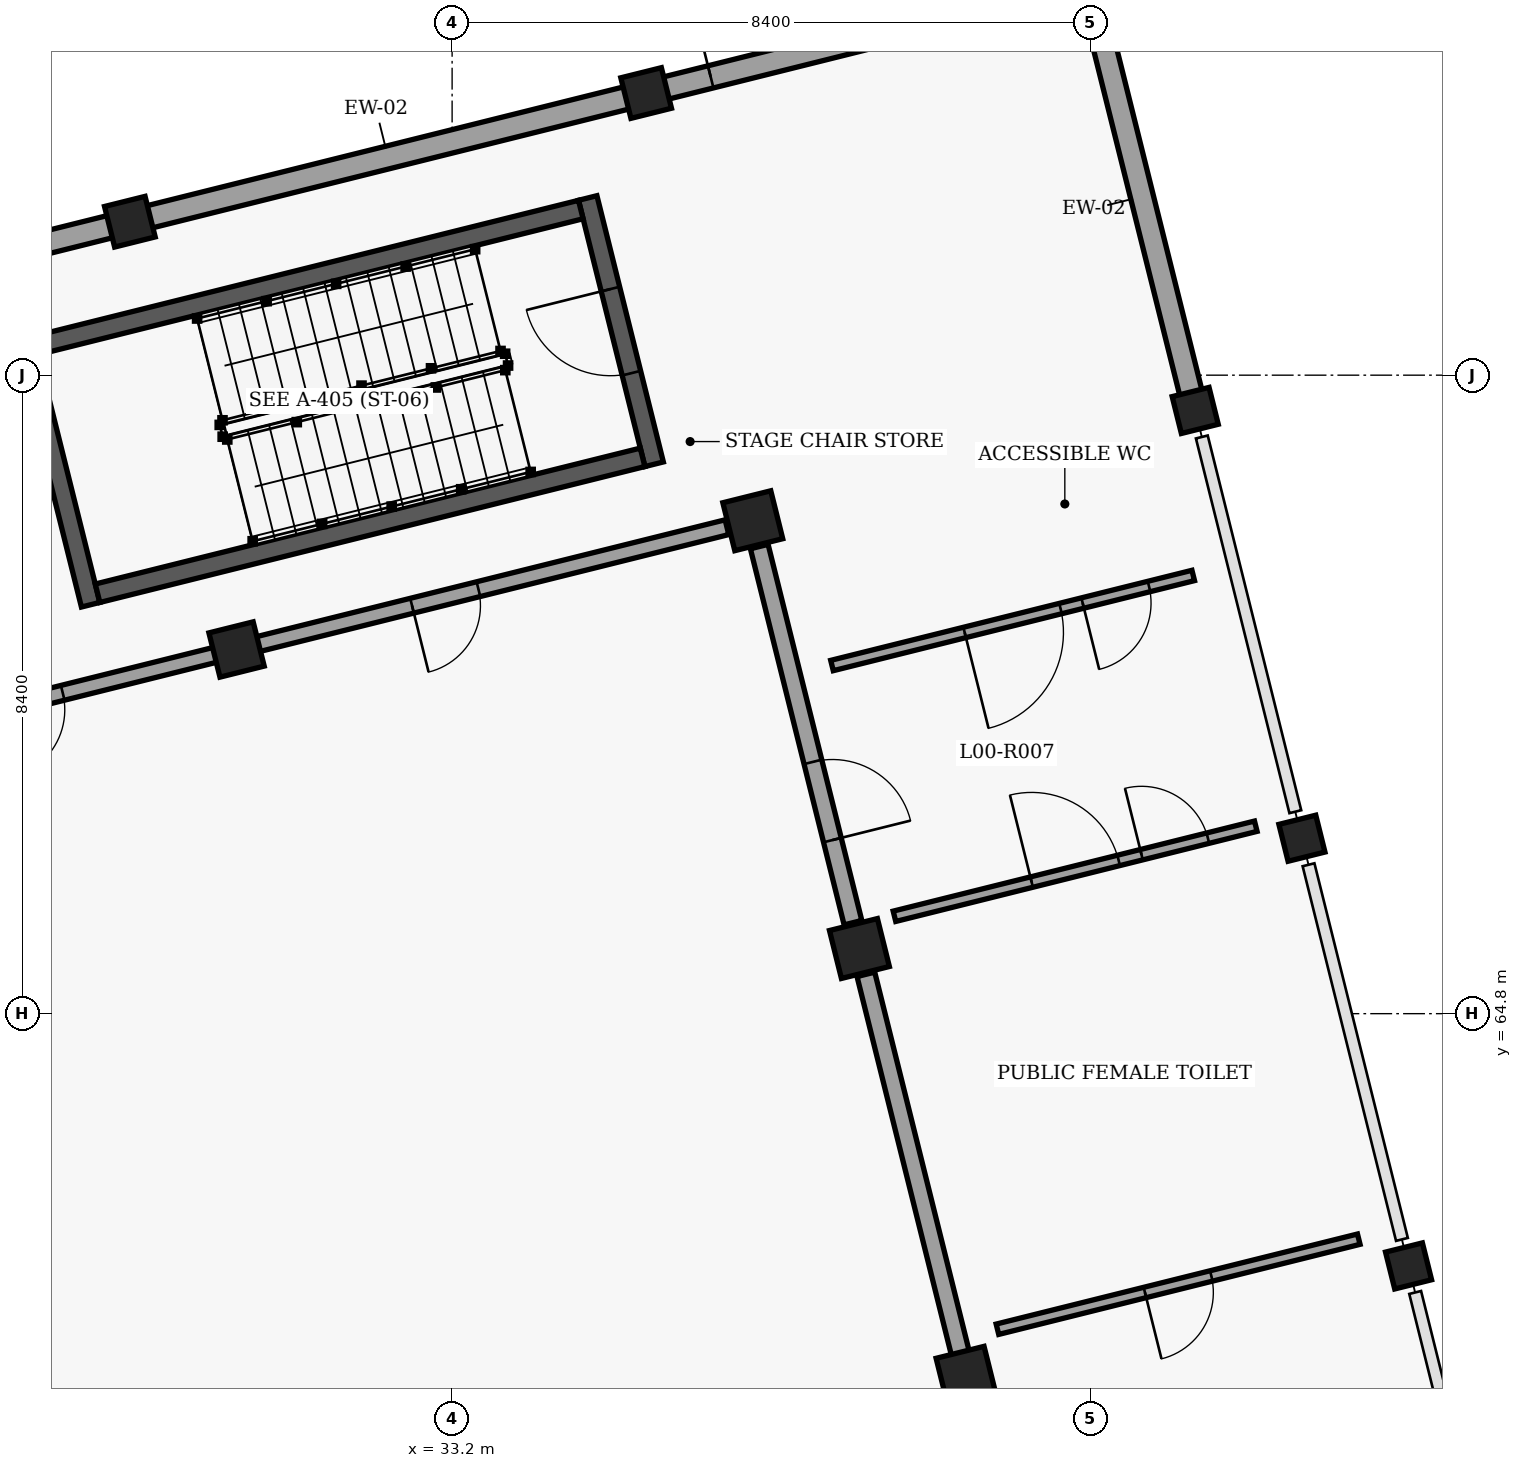
"""IFC4 building model, lengths in metres.
Left out: names, types, materials, properties, quantities, classifications, styles, units other than length and angle.
Written with IfcOpenShell. Run it as: python <this file> out.ifc"""

import sys

from ifc_helpers import new_model, si_unit, direction, frame, frame_2d, origin, origin_2d, place, context, subcontext, project, spatial, rectangle, extrude, element, fill, save


model = new_model("IFC4")
c1 = context("Model", 3, precision=1e-05, world=origin(), true_north=direction((0.0, 1.0)))
c2 = subcontext(c1, "Body", "Model", "MODEL_VIEW")
j1 = project(units=[si_unit("LENGTHUNIT", "METRE"), si_unit("PLANEANGLEUNIT", "RADIAN")], contexts=[c1])
p1 = place(None, origin())
s1 = spatial("IfcSite", under=j1, at=p1, CompositionType="ELEMENT")
p2 = place(p1, origin())
s2 = spatial("IfcBuilding", under=s1, at=p2, CompositionType="ELEMENT")
p3 = place(p2, origin())
s3 = spatial("IfcBuildingStorey", under=s2, at=p3, CompositionType="ELEMENT", Elevation=0.0)
for number, where, z_axis, x_axis in (
    (1, (39.962, 60.029, 0.0), (0.0, 0.0, 1.0), (0.97, 0.242, 0.0)),
    (2, (38.559, 65.657, 0.0), (0.0, 0.0, 1.0), (0.97, 0.242, 0.0)),
    (3, (37.156, 71.285, 0.0), (0.0, 0.0, 1.0), (0.97, 0.242, 0.0)),
):
    element("IfcColumn", number, at=place(p3, frame(where, z_axis=z_axis, x_axis=x_axis)), inside=s3, PredefinedType="COLUMN", context=c2, shape_type="SweptSolid", body=[
        extrude(rectangle(XDim=0.65, YDim=0.65, at=origin_2d()), origin(), (0.0, 0.0, 1.0), 4.8),
    ])
for number, where, z_axis, x_axis in (
    (4, (45.784, 61.481, 0.0), (0.0, 0.0, 1.0), (0.97, 0.242, 0.0)),
    (5, (44.381, 67.108, 0.0), (0.0, 0.0, 1.0), (0.97, 0.242, 0.0)),
    (6, (42.977, 72.736, 0.0), (0.0, 0.0, 1.0), (0.97, 0.242, 0.0)),
):
    element("IfcColumn", number, at=place(p3, frame(where, z_axis=z_axis, x_axis=x_axis)), inside=s3, PredefinedType="COLUMN", context=c2, shape_type="SweptSolid", body=[
        extrude(rectangle(XDim=0.5, YDim=0.5, at=origin_2d()), origin(), (0.0, 0.0, 1.0), 4.8),
    ])
p4 = place(p3, frame((30.364, 69.591, 0.0), z_axis=(0.0, 0.0, 1.0), x_axis=(0.970295726276, 0.2419218956, 0.0)))
e7 = element("IfcColumn", 7, at=p4, inside=s3, PredefinedType="COLUMN", context=c2, shape_type="SweptSolid", body=[
    extrude(rectangle(XDim=0.6, YDim=0.6, at=origin_2d()), origin(), (0.0, 0.0, 1.0), 4.8),
])
for number, where, z_axis, x_axis in (
    (8, (28.96, 75.219, 0.0), (0.0, 0.0, 1.0), (0.97, 0.242, 0.0)),
    (9, (35.753, 76.912, 0.0), (0.0, 0.0, 1.0), (0.97, 0.242, 0.0)),
):
    element("IfcColumn", number, at=place(p3, frame(where, z_axis=z_axis, x_axis=x_axis)), inside=s3, PredefinedType="COLUMN", context=c2, shape_type="SweptSolid", body=[
        extrude(rectangle(XDim=0.55, YDim=0.55, at=origin_2d()), origin(), (0.0, 0.0, 1.0), 4.8),
    ])
p5 = place(p3, frame((42.958, 72.814, 0.0), z_axis=(0.0, 0.0, 1.0), x_axis=(-0.242036480393, 0.970267149892, 0.0)))
e10 = element("IfcWall", 10, at=p5, inside=s3, PredefinedType="SOLIDWALL", context=c2, shape_type="SweptSolid", body=[
    extrude(rectangle(XDim=5.64, YDim=0.3, at=frame_2d((2.82, 0.0))), origin(), (0.0, 0.0, 1.0), 4.095),
])
p6 = place(p3, frame((22.265, 73.55, 0.0), z_axis=(0.0, 0.0, 1.0), x_axis=(0.970298579828, 0.24191045034, 0.0)))
e11 = element("IfcWall", 11, at=p6, inside=s3, PredefinedType="SOLIDWALL", context=c2, shape_type="SweptSolid", body=[
    extrude(rectangle(XDim=6.8, YDim=0.3, at=frame_2d((3.4, 0.0))), origin(), (0.0, 0.0, 1.0), 4.065),
])
p7 = place(p3, frame((29.058, 75.243, 0.0), z_axis=(0.0, 0.0, 1.0), x_axis=(0.970296478685, 0.241918877831, 0.0)))
e12 = element("IfcWall", 12, at=p7, inside=s3, PredefinedType="SOLIDWALL", context=c2, shape_type="SweptSolid", body=[
    extrude(rectangle(XDim=6.8, YDim=0.3, at=frame_2d((3.4, 0.0))), origin(), (0.0, 0.0, 1.0), 4.065),
])
p8 = place(p3, frame((35.85, 76.937, 0.0), z_axis=(0.0, 0.0, 1.0), x_axis=(0.97029090175, 0.241941244896, 0.0)))
e13 = element("IfcWall", 13, at=p8, inside=s3, PredefinedType="SOLIDWALL", context=c2, shape_type="SweptSolid", body=[
    extrude(rectangle(XDim=5.799, YDim=0.3, at=frame_2d((2.9, 0.0))), origin(), (0.0, 0.0, 1.0), 4.065),
])
p9 = place(p8, frame((0.775, 0.0, 0.0)))
e14 = element("IfcOpeningElement", 14, at=p9, cuts=e13, PredefinedType="OPENING", context=c2, shape_type="SweptSolid", body=[
    extrude(rectangle(XDim=2.05, YDim=2.32, at=frame_2d((1.025, 1.16))), frame((0.0, 0.16, 0.0), z_axis=(0.0, -1.0, 0.0), x_axis=(1.0, 0.0, 0.0)), (0.0, 0.0, 1.0), 0.32),
])
p10 = place(p3, frame((34.984, 75.531, 0.0), z_axis=(0.0, 0.0, 1.0), x_axis=(0.242090083699, -0.97025377679, 0.0)))
e15 = element("IfcWall", 15, at=p10, inside=s3, PredefinedType="SHEAR", context=c2, shape_type="SweptSolid", body=[
    extrude(rectangle(XDim=3.61, YDim=0.25, at=frame_2d((1.805, 0.0))), origin(), (0.0, 0.0, 1.0), 4.56),
])
p11 = place(p10, frame((1.235, 0.0, 0.0)))
e16 = element("IfcOpeningElement", 16, at=p11, cuts=e15, PredefinedType="OPENING", context=c2, shape_type="SweptSolid", body=[
    extrude(rectangle(XDim=1.14, YDim=2.15, at=frame_2d((0.57, 1.075))), frame((0.0, 0.135, 0.0), z_axis=(0.0, -1.0, 0.0), x_axis=(1.0, 0.0, 0.0)), (0.0, 0.0, 1.0), 0.27),
])
p12 = place(p3, frame((28.444, 70.18, 0.0), z_axis=(0.0, 0.0, 1.0), x_axis=(-0.241898912952, 0.970301456204, 0.0)))
e17 = element("IfcWall", 17, at=p12, inside=s3, PredefinedType="SHEAR", context=c2, shape_type="SweptSolid", body=[
    extrude(rectangle(XDim=3.609, YDim=0.25, at=frame_2d((1.805, 0.0))), origin(), (0.0, 0.0, 1.0), 4.56),
])
p13 = place(p3, frame((35.706, 72.119, 0.0), z_axis=(0.0, 0.0, 1.0), x_axis=(-0.970299691856, -0.241905989972, 0.0)))
e18 = element("IfcWall", 18, at=p13, inside=s3, PredefinedType="SHEAR", context=c2, shape_type="SweptSolid", body=[
    extrude(rectangle(XDim=7.391, YDim=0.25, at=frame_2d((3.695, 0.0))), origin(), (0.0, 0.0, 1.0), 4.56),
])
p14 = place(p3, frame((27.723, 73.591, 0.0), z_axis=(0.0, 0.0, 1.0), x_axis=(0.970291958031, 0.241937008705, 0.0)))
e19 = element("IfcWall", 19, at=p14, inside=s3, PredefinedType="SHEAR", context=c2, shape_type="SweptSolid", body=[
    extrude(rectangle(XDim=7.39, YDim=0.25, at=frame_2d((3.695, 0.0))), origin(), (0.0, 0.0, 1.0), 4.56),
])
p15 = place(p3, frame((41.28, 54.742, 0.0), z_axis=(0.0, 0.0, 1.0), x_axis=(-0.241866165603, 0.970309619625, 0.0)))
e20 = element("IfcWall", 20, at=p15, inside=s3, PredefinedType="PARTITIONING", context=c2, shape_type="SweptSolid", body=[
    extrude(rectangle(XDim=10.898, YDim=0.24, at=frame_2d((5.449, 0.0))), origin(), (0.0, 0.0, 1.0), 4.006),
])
p16 = place(p15, frame((3.539, 0.0, 0.0)))
e21 = element("IfcOpeningElement", 21, at=p16, cuts=e20, PredefinedType="OPENING", context=c2, shape_type="SweptSolid", body=[
    extrude(rectangle(XDim=1.12, YDim=2.16, at=frame_2d((0.56, 1.08))), frame((0.0, 0.13, 0.0), z_axis=(0.0, -1.0, 0.0), x_axis=(1.0, 0.0, 0.0)), (0.0, 0.0, 1.0), 0.26),
])
p17 = place(p3, frame((38.474, 65.997, 0.0), z_axis=(0.0, 0.0, 1.0), x_axis=(-0.241825856576, 0.970319666446, 0.0)))
e22 = element("IfcWall", 22, at=p17, inside=s3, PredefinedType="PARTITIONING", context=c2, shape_type="SweptSolid", body=[
    extrude(rectangle(XDim=5.099, YDim=0.24, at=frame_2d((2.55, 0.0))), origin(), (0.0, 0.0, 1.0), 3.845),
])
p18 = place(p17, frame((1.12, 0.0, 0.0)))
e23 = element("IfcOpeningElement", 23, at=p18, cuts=e22, PredefinedType="OPENING", context=c2, shape_type="SweptSolid", body=[
    extrude(rectangle(XDim=1.06, YDim=2.16, at=frame_2d((0.53, 1.08))), frame((0.0, 0.13, 0.0), z_axis=(0.0, -1.0, 0.0), x_axis=(1.0, 0.0, 0.0)), (0.0, 0.0, 1.0), 0.26),
])
p19 = place(p3, frame((17.119, 66.289, 0.0), z_axis=(0.0, 0.0, 1.0), x_axis=(0.970297233618, 0.241915849902, 0.0)))
e24 = element("IfcWall", 24, at=p19, inside=s3, PredefinedType="PARTITIONING", context=c2, shape_type="SweptSolid", body=[
    extrude(rectangle(XDim=20.3, YDim=0.2, at=frame_2d((10.15, 0.0))), origin(), (0.0, 0.0, 1.0), 3.845),
])
p20 = place(p19, frame((7.192, 0.0, 0.0)))
e25 = element("IfcOpeningElement", 25, at=p20, cuts=e24, PredefinedType="OPENING", context=c2, shape_type="SweptSolid", body=[
    extrude(rectangle(XDim=0.95, YDim=2.12, at=frame_2d((0.475, 1.06))), frame((0.0, 0.11, 0.0), z_axis=(0.0, -1.0, 0.0), x_axis=(1.0, 0.0, 0.0)), (0.0, 0.0, 1.0), 0.22),
])
p21 = place(p19, frame((10.373, 0.0, 0.0)))
e26 = element("IfcOpeningElement", 26, at=p21, cuts=e24, PredefinedType="OPENING", context=c2, shape_type="SweptSolid", body=[
    extrude(rectangle(XDim=0.92, YDim=2.1, at=frame_2d((0.46, 1.05))), frame((0.0, 0.11, 0.0), z_axis=(0.0, -1.0, 0.0), x_axis=(1.0, 0.0, 0.0)), (0.0, 0.0, 1.0), 0.22),
])
p22 = place(p19, frame((5.12, 0.0, 0.0)))
e27 = element("IfcOpeningElement", 27, at=p22, cuts=e24, PredefinedType="OPENING", context=c2, shape_type="SweptSolid", body=[
    extrude(rectangle(XDim=0.9, YDim=2.06, at=frame_2d((0.45, 1.03))), frame((0.0, 0.11, 0.0), z_axis=(0.0, -1.0, 0.0), x_axis=(1.0, 0.0, 0.0)), (0.0, 0.0, 1.0), 0.22),
])
p23 = place(p19, frame((16.03, 0.0, 0.0)))
e28 = element("IfcOpeningElement", 28, at=p23, cuts=e24, PredefinedType="OPENING", context=c2, shape_type="SweptSolid", body=[
    extrude(rectangle(XDim=0.9, YDim=2.06, at=frame_2d((0.45, 1.03))), frame((0.0, 0.11, 0.0), z_axis=(0.0, -1.0, 0.0), x_axis=(1.0, 0.0, 0.0)), (0.0, 0.0, 1.0), 0.22),
])
p24 = place(p3, frame((40.375, 60.648, 0.0), z_axis=(0.0, 0.0, 1.0), x_axis=(0.970306426655, 0.241878974681, 0.0)))
e29 = element("IfcWall", 29, at=p24, inside=s3, PredefinedType="PARTITIONING", context=c2, shape_type="SweptSolid", body=[
    extrude(rectangle(XDim=4.899, YDim=0.14, at=frame_2d((2.45, 0.0))), origin(), (0.0, 0.0, 1.0), 4.187),
])
p25 = place(p24, frame((2.0, 0.0, 0.0)))
e30 = element("IfcOpeningElement", 30, at=p25, cuts=e29, PredefinedType="OPENING", context=c2, shape_type="SweptSolid", body=[
    extrude(rectangle(XDim=0.9, YDim=2.06, at=frame_2d((0.45, 1.03))), frame((0.0, 0.08, 0.0), z_axis=(0.0, -1.0, 0.0), x_axis=(1.0, 0.0, 0.0)), (0.0, 0.0, 1.0), 0.16),
])
p26 = place(p3, frame((39.02, 66.081, 0.0), z_axis=(0.0, 0.0, 1.0), x_axis=(0.970306426655, 0.241878974681, 0.0)))
e31 = element("IfcWall", 31, at=p26, inside=s3, PredefinedType="PARTITIONING", context=c2, shape_type="SweptSolid", body=[
    extrude(rectangle(XDim=4.899, YDim=0.14, at=frame_2d((2.45, 0.0))), origin(), (0.0, 0.0, 1.0), 4.187),
])
p27 = place(p26, frame((1.86, 0.0, 0.0)))
e32 = element("IfcOpeningElement", 32, at=p27, cuts=e31, PredefinedType="OPENING", context=c2, shape_type="SweptSolid", body=[
    extrude(rectangle(XDim=1.18, YDim=2.18, at=frame_2d((0.59, 1.09))), frame((0.0, 0.08, 0.0), z_axis=(0.0, -1.0, 0.0), x_axis=(1.0, 0.0, 0.0)), (0.0, 0.0, 1.0), 0.16),
])
p28 = place(p26, frame((3.35, 0.0, 0.0)))
e33 = element("IfcOpeningElement", 33, at=p28, cuts=e31, PredefinedType="OPENING", context=c2, shape_type="SweptSolid", body=[
    extrude(rectangle(XDim=0.9, YDim=2.06, at=frame_2d((0.45, 1.03))), frame((0.0, 0.08, 0.0), z_axis=(0.0, -1.0, 0.0), x_axis=(1.0, 0.0, 0.0)), (0.0, 0.0, 1.0), 0.16),
])
p29 = place(p3, frame((38.198, 69.38, 0.0), z_axis=(0.0, 0.0, 1.0), x_axis=(0.970294761766, 0.241925764003, 0.0)))
e34 = element("IfcWall", 34, at=p29, inside=s3, PredefinedType="PARTITIONING", context=c2, shape_type="SweptSolid", body=[
    extrude(rectangle(XDim=4.898, YDim=0.14, at=frame_2d((2.449, 0.0))), origin(), (0.0, 0.0, 1.0), 4.187),
])
p30 = place(p29, frame((1.799, 0.0, 0.0)))
e35 = element("IfcOpeningElement", 35, at=p30, cuts=e34, PredefinedType="OPENING", context=c2, shape_type="SweptSolid", body=[
    extrude(rectangle(XDim=1.3, YDim=2.2, at=frame_2d((0.65, 1.1))), frame((0.0, 0.08, 0.0), z_axis=(0.0, -1.0, 0.0), x_axis=(1.0, 0.0, 0.0)), (0.0, 0.0, 1.0), 0.16),
])
p31 = place(p29, frame((3.399, 0.0, 0.0)))
e36 = element("IfcOpeningElement", 36, at=p31, cuts=e34, PredefinedType="OPENING", context=c2, shape_type="SweptSolid", body=[
    extrude(rectangle(XDim=0.9, YDim=2.06, at=frame_2d((0.45, 1.03))), frame((0.0, 0.08, 0.0), z_axis=(0.0, -1.0, 0.0), x_axis=(1.0, 0.0, 0.0)), (0.0, 0.0, 1.0), 0.16),
])
p32 = place(p11, origin())
e37 = element("IfcDoor", 37, at=p32, inside=s3, OperationType="SINGLE_SWING_RIGHT", PredefinedType="DOOR", context=c2, shape_type="SweptSolid", body=[
    extrude(rectangle(XDim=1.14, YDim=2.15, at=frame_2d((0.57, 1.075))), frame((0.0, 0.025, 0.0), z_axis=(0.0, -1.0, 0.0), x_axis=(1.0, 0.0, 0.0)), (0.0, 0.0, 1.0), 0.05),
])
fill(e16, e37)
p33 = place(p9, origin())
e38 = element("IfcDoor", 38, at=p33, inside=s3, OperationType="DOUBLE_DOOR_SINGLE_SWING", PredefinedType="GATE", context=c2, shape_type="SweptSolid", body=[
    extrude(rectangle(XDim=2.05, YDim=2.32, at=frame_2d((1.025, 1.16))), frame((0.0, 0.025, 0.0), z_axis=(0.0, -1.0, 0.0), x_axis=(1.0, 0.0, 0.0)), (0.0, 0.0, 1.0), 0.05),
])
fill(e14, e38)
p34 = place(p18, origin())
e39 = element("IfcDoor", 39, at=p34, inside=s3, OperationType="SINGLE_SWING_RIGHT", PredefinedType="DOOR", context=c2, shape_type="SweptSolid", body=[
    extrude(rectangle(XDim=1.06, YDim=2.16, at=frame_2d((0.53, 1.08))), frame((0.0, 0.025, 0.0), z_axis=(0.0, -1.0, 0.0), x_axis=(1.0, 0.0, 0.0)), (0.0, 0.0, 1.0), 0.05),
])
fill(e23, e39)
p35 = place(p21, origin())
e40 = element("IfcDoor", 40, at=p35, inside=s3, OperationType="SINGLE_SWING_RIGHT", PredefinedType="DOOR", context=c2, shape_type="SweptSolid", body=[
    extrude(rectangle(XDim=0.92, YDim=2.1, at=frame_2d((0.46, 1.05))), frame((0.0, 0.025, 0.0), z_axis=(0.0, -1.0, 0.0), x_axis=(1.0, 0.0, 0.0)), (0.0, 0.0, 1.0), 0.05),
])
fill(e26, e40)
p36 = place(p25, origin())
e41 = element("IfcDoor", 41, at=p36, inside=s3, OperationType="SINGLE_SWING_RIGHT", PredefinedType="DOOR", context=c2, shape_type="SweptSolid", body=[
    extrude(rectangle(XDim=0.9, YDim=2.06, at=frame_2d((0.45, 1.03))), frame((0.0, 0.025, 0.0), z_axis=(0.0, -1.0, 0.0), x_axis=(1.0, 0.0, 0.0)), (0.0, 0.0, 1.0), 0.05),
])
fill(e30, e41)
p37 = place(p27, origin())
e42 = element("IfcDoor", 42, at=p37, inside=s3, OperationType="SINGLE_SWING_LEFT", PredefinedType="DOOR", context=c2, shape_type="SweptSolid", body=[
    extrude(rectangle(XDim=1.18, YDim=2.18, at=frame_2d((0.59, 1.09))), frame((0.0, 0.025, 0.0), z_axis=(0.0, -1.0, 0.0), x_axis=(1.0, 0.0, 0.0)), (0.0, 0.0, 1.0), 0.05),
])
fill(e32, e42)
p38 = place(p30, origin())
e43 = element("IfcDoor", 43, at=p38, inside=s3, OperationType="SINGLE_SWING_RIGHT", PredefinedType="DOOR", context=c2, shape_type="SweptSolid", body=[
    extrude(rectangle(XDim=1.3, YDim=2.2, at=frame_2d((0.65, 1.1))), frame((0.0, 0.025, 0.0), z_axis=(0.0, -1.0, 0.0), x_axis=(1.0, 0.0, 0.0)), (0.0, 0.0, 1.0), 0.05),
])
fill(e35, e43)
p39 = place(p28, origin())
e44 = element("IfcDoor", 44, at=p39, inside=s3, OperationType="SINGLE_SWING_LEFT", PredefinedType="DOOR", context=c2, shape_type="SweptSolid", body=[
    extrude(rectangle(XDim=0.9, YDim=2.06, at=frame_2d((0.45, 1.03))), frame((0.0, 0.025, 0.0), z_axis=(0.0, -1.0, 0.0), x_axis=(1.0, 0.0, 0.0)), (0.0, 0.0, 1.0), 0.05),
])
fill(e33, e44)
p40 = place(p31, origin())
e45 = element("IfcDoor", 45, at=p40, inside=s3, OperationType="SINGLE_SWING_RIGHT", PredefinedType="DOOR", context=c2, shape_type="SweptSolid", body=[
    extrude(rectangle(XDim=0.9, YDim=2.06, at=frame_2d((0.45, 1.03))), frame((0.0, 0.025, 0.0), z_axis=(0.0, -1.0, 0.0), x_axis=(1.0, 0.0, 0.0)), (0.0, 0.0, 1.0), 0.05),
])
fill(e36, e45)
p41 = place(p23, origin())
e46 = element("IfcDoor", 46, at=p41, inside=s3, OperationType="SINGLE_SWING_RIGHT", PredefinedType="DOOR", context=c2, shape_type="SweptSolid", body=[
    extrude(rectangle(XDim=0.9, YDim=2.06, at=frame_2d((0.45, 1.03))), frame((0.0, 0.025, 0.0), z_axis=(0.0, -1.0, 0.0), x_axis=(1.0, 0.0, 0.0)), (0.0, 0.0, 1.0), 0.05),
])
fill(e28, e46)
save(model, sys.argv[1])
